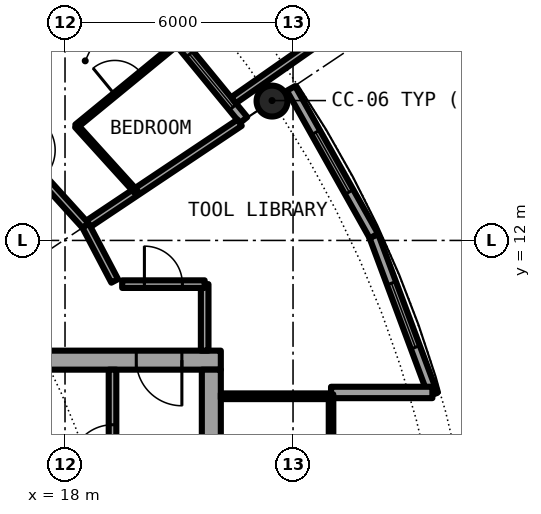
"""IFC4 building model, lengths in metres.
Left out: names, types, materials, properties, quantities, classifications, styles, units other than length and angle.
Written with IfcOpenShell. Run it as: python <this file> out.ifc"""

import sys

from ifc_helpers import new_model, si_unit, direction, frame, frame_2d, origin, origin_2d, place, context, subcontext, project, spatial, rectangle, hollow_circle, extrude, element, fill, save


model = new_model("IFC4")
c1 = context("Model", 3, precision=1e-05, world=origin(), true_north=direction((0.0, 1.0)))
c2 = subcontext(c1, "Body", "Model", "MODEL_VIEW")
j1 = project(units=[si_unit("LENGTHUNIT", "METRE"), si_unit("PLANEANGLEUNIT", "RADIAN")], contexts=[c1])
p1 = place(None, origin())
s1 = spatial("IfcSite", under=j1, at=p1, CompositionType="ELEMENT")
p2 = place(p1, origin())
s2 = spatial("IfcBuilding", under=s1, at=p2, CompositionType="ELEMENT")
p3 = place(p2, frame((0.0, 0.0, 145.2)))
s3 = spatial("IfcBuildingStorey", under=s2, at=p3, CompositionType="ELEMENT", Elevation=145.2)
p4 = place(p3, frame((23.448, 15.667, 0.0), z_axis=(0.0, 0.0, 1.0), x_axis=(1.0, 0.0, 0.0)))
e1 = element("IfcColumn", 1, at=p4, inside=s3, PredefinedType="COLUMN", context=c2, shape_type="SweptSolid", body=[
    extrude(hollow_circle(Radius=0.406, WallThickness=0.04, at=origin_2d()), origin(), (0.0, 0.0, 1.0), 3.05),
])
p5 = place(p3, frame((22.699, 15.167, 0.0), z_axis=(0.0, 0.0, 1.0), x_axis=(-0.634382322723, 0.773019449054, 0.0)))
e2 = element("IfcWall", 2, at=p5, inside=s3, PredefinedType="SOLIDWALL", context=c2, shape_type="SweptSolid", body=[
    extrude(rectangle(XDim=5.352, YDim=0.25, at=frame_2d((2.676, 0.0))), origin(), (0.0, 0.0, 1.0), 2.7),
])
p6 = place(p5, frame((0.441, 0.0, 0.3)))
e3 = element("IfcOpeningElement", 3, at=p6, cuts=e2, PredefinedType="OPENING", context=c2, shape_type="SweptSolid", body=[
    extrude(rectangle(XDim=1.8, YDim=2.1, at=frame_2d((0.9, 1.05))), frame((0.0, 0.135, 0.0), z_axis=(0.0, -1.0, 0.0), x_axis=(1.0, 0.0, 0.0)), (0.0, 0.0, 1.0), 0.27),
])
p7 = place(p5, frame((3.51, 0.0, 0.0)))
e4 = element("IfcOpeningElement", 4, at=p7, cuts=e2, PredefinedType="OPENING", context=c2, shape_type="SweptSolid", body=[
    extrude(rectangle(XDim=1.0, YDim=2.2, at=frame_2d((0.5, 1.1))), frame((0.0, 0.135, 0.0), z_axis=(0.0, -1.0, 0.0), x_axis=(1.0, 0.0, 0.0)), (0.0, 0.0, 1.0), 0.27),
])
p8 = place(p3, frame((22.433, 15.688, -0.03), z_axis=(0.0, 0.0, 1.0), x_axis=(0.819373043115, 0.573260687834, 0.0)))
e5 = element("IfcWall", 5, at=p8, inside=s3, PredefinedType="SOLIDWALL", context=c2, shape_type="SweptSolid", body=[
    extrude(rectangle(XDim=2.925, YDim=0.2, at=frame_2d((1.463, 0.0))), origin(), (0.0, 0.0, 1.0), 2.73),
])
p9 = place(p3, frame((27.682, 7.945, 0.0), z_axis=(0.0, 0.0, 1.0), x_axis=(-0.349247811493, 0.937030397675, 0.0)))
e6 = element("IfcWall", 6, at=p9, inside=s3, PredefinedType="SOLIDWALL", context=c2, shape_type="SweptSolid", body=[
    extrude(rectangle(XDim=4.452, YDim=0.25, at=frame_2d((2.226, 0.0))), origin(), (0.0, 0.0, 1.0), 2.7),
])
p10 = place(p9, frame((1.327, 0.0, 0.3)))
e7 = element("IfcOpeningElement", 7, at=p10, cuts=e6, PredefinedType="OPENING", context=c2, shape_type="SweptSolid", body=[
    extrude(rectangle(XDim=1.8, YDim=2.1, at=frame_2d((0.9, 1.05))), frame((0.0, 0.135, 0.0), z_axis=(0.0, -1.0, 0.0), x_axis=(1.0, 0.0, 0.0)), (0.0, 0.0, 1.0), 0.27),
])
p11 = place(p3, frame((26.127, 12.117, 0.0), z_axis=(0.0, 0.0, 1.0), x_axis=(-0.489696356642, 0.871893042919, 0.0)))
e8 = element("IfcWall", 8, at=p11, inside=s3, PredefinedType="SOLIDWALL", context=c2, shape_type="SweptSolid", body=[
    extrude(rectangle(XDim=4.454, YDim=0.25, at=frame_2d((2.227, 0.0))), origin(), (0.0, 0.0, 1.0), 2.7),
])
p12 = place(p11, frame((1.327, 0.0, 0.3)))
e9 = element("IfcOpeningElement", 9, at=p12, cuts=e8, PredefinedType="OPENING", context=c2, shape_type="SweptSolid", body=[
    extrude(rectangle(XDim=1.8, YDim=2.1, at=frame_2d((0.9, 1.05))), frame((0.0, 0.135, 0.0), z_axis=(0.0, -1.0, 0.0), x_axis=(1.0, 0.0, 0.0)), (0.0, 0.0, 1.0), 0.27),
])
p13 = place(p3, frame((25.0, 8.0, 0.0), z_axis=(0.0, 0.0, 1.0), x_axis=(1.0, 0.0, 0.0)))
e10 = element("IfcWall", 10, at=p13, inside=s3, PredefinedType="SOLIDWALL", context=c2, shape_type="SweptSolid", body=[
    extrude(rectangle(XDim=2.667, YDim=0.3, at=frame_2d((1.333, 0.0))), origin(), (0.0, 0.0, 1.0), 2.7),
])
p14 = place(p3, frame((22.1, 8.85, 0.0), z_axis=(0.0, 0.0, 1.0), x_axis=(-1.0, 0.0, 0.0)))
e11 = element("IfcWall", 11, at=p14, inside=s3, PredefinedType="SHEAR", context=c2, shape_type="SweptSolid", body=[
    extrude(rectangle(XDim=13.6, YDim=0.5, at=frame_2d((6.8, 0.0))), origin(), (0.0, 0.0, 1.0), 3.05),
])
p15 = place(p14, frame((1.025, 0.0, 0.0)))
e12 = element("IfcOpeningElement", 12, at=p15, cuts=e11, PredefinedType="OPENING", context=c2, shape_type="SweptSolid", body=[
    extrude(rectangle(XDim=1.2, YDim=2.3, at=frame_2d((0.6, 1.15))), frame((0.0, 0.26, 0.0), z_axis=(0.0, -1.0, 0.0), x_axis=(1.0, 0.0, 0.0)), (0.0, 0.0, 1.0), 0.52),
])
p16 = place(p3, frame((21.85, 8.6, 0.0), z_axis=(0.0, 0.0, 1.0), x_axis=(0.0, -1.0, 0.0)))
e13 = element("IfcWall", 13, at=p16, inside=s3, PredefinedType="SHEAR", context=c2, shape_type="SweptSolid", body=[
    extrude(rectangle(XDim=17.2, YDim=0.5, at=frame_2d((8.6, 0.0))), origin(), (0.0, 0.0, 1.0), 3.05),
])
p17 = place(p16, frame((7.7, 0.0, 0.0)))
e14 = element("IfcOpeningElement", 14, at=p17, cuts=e13, PredefinedType="OPENING", context=c2, shape_type="SweptSolid", body=[
    extrude(rectangle(XDim=1.8, YDim=2.3, at=frame_2d((0.9, 1.15))), frame((0.0, 0.26, 0.0), z_axis=(0.0, -1.0, 0.0), x_axis=(1.0, 0.0, 0.0)), (0.0, 0.0, 1.0), 0.52),
])
p18 = place(p3, frame((19.25, 1.575, 0.0), z_axis=(0.0, 0.0, 1.0), x_axis=(0.0, 1.0, 0.0)))
e15 = element("IfcWall", 15, at=p18, inside=s3, PredefinedType="SOLIDWALL", context=c2, shape_type="SweptSolid", body=[
    extrude(rectangle(XDim=7.025, YDim=0.2, at=frame_2d((3.513, 0.0))), origin(), (0.0, 0.0, 1.0), 2.7),
])
p19 = place(p18, frame((4.475, 0.0, 0.0)))
e16 = element("IfcOpeningElement", 16, at=p19, cuts=e15, PredefinedType="OPENING", context=c2, shape_type="SweptSolid", body=[
    extrude(rectangle(XDim=1.1, YDim=2.3, at=frame_2d((0.55, 1.15))), frame((0.0, 0.11, 0.0), z_axis=(0.0, -1.0, 0.0), x_axis=(1.0, 0.0, 0.0)), (0.0, 0.0, 1.0), 0.22),
])
p20 = place(p3, frame((22.1, 7.9, 0.0), z_axis=(0.0, 0.0, 1.0), x_axis=(1.0, 0.0, 0.0)))
e17 = element("IfcWall", 17, at=p20, inside=s3, PredefinedType="PARTITIONING", context=c2, shape_type="SweptSolid", body=[
    extrude(rectangle(XDim=2.84, YDim=0.15, at=frame_2d((1.42, 0.0))), origin(), (0.0, 0.0, 1.0), 2.7),
])
p21 = place(p3, frame((25.0, 7.95, 0.0), z_axis=(0.0, 0.0, 1.0), x_axis=(0.0, -1.0, 0.0)))
e18 = element("IfcWall", 18, at=p21, inside=s3, PredefinedType="PARTITIONING", context=c2, shape_type="SweptSolid", body=[
    extrude(rectangle(XDim=15.9, YDim=0.12, at=frame_2d((7.95, 0.0))), origin(), (0.0, 0.0, 1.0), 2.7),
])
p22 = place(p21, frame((6.75, 0.0, 0.0)))
e19 = element("IfcOpeningElement", 19, at=p22, cuts=e18, PredefinedType="OPENING", context=c2, shape_type="SweptSolid", body=[
    extrude(rectangle(XDim=2.4, YDim=2.3, at=frame_2d((1.2, 1.15))), frame((0.0, 0.07, 0.0), z_axis=(0.0, -1.0, 0.0), x_axis=(1.0, 0.0, 0.0)), (0.0, 0.0, 1.0), 0.14),
])
p23 = place(p21, frame((11.55, 0.0, 0.1)))
e20 = element("IfcOpeningElement", 20, at=p23, cuts=e18, PredefinedType="OPENING", context=c2, shape_type="SweptSolid", body=[
    extrude(rectangle(XDim=3.4, YDim=2.35, at=frame_2d((1.7, 1.175))), frame((0.0, 0.07, 0.0), z_axis=(0.0, -1.0, 0.0), x_axis=(1.0, 0.0, 0.0)), (0.0, 0.0, 1.0), 0.14),
])
p24 = place(p21, frame((0.95, 0.0, 0.1)))
e21 = element("IfcOpeningElement", 21, at=p24, cuts=e18, PredefinedType="OPENING", context=c2, shape_type="SweptSolid", body=[
    extrude(rectangle(XDim=3.4, YDim=2.35, at=frame_2d((1.7, 1.175))), frame((0.0, 0.07, 0.0), z_axis=(0.0, -1.0, 0.0), x_axis=(1.0, 0.0, 0.0)), (0.0, 0.0, 1.0), 0.14),
])
p25 = place(p3, frame((21.675, 9.1, 0.0), z_axis=(0.0, 0.0, 1.0), x_axis=(0.0, 1.0, 0.0)))
e22 = element("IfcWall", 22, at=p25, inside=s3, PredefinedType="PARTITIONING", context=c2, shape_type="SweptSolid", body=[
    extrude(rectangle(XDim=1.75, YDim=0.2, at=frame_2d((0.875, 0.0))), origin(), (0.0, 0.0, 1.0), 2.7),
])
p26 = place(p3, frame((18.302, 15.01, 0.0), z_axis=(0.0, 0.0, 1.0), x_axis=(0.773165322764, 0.634204528267, 0.0)))
e23 = element("IfcWall", 23, at=p26, inside=s3, PredefinedType="PARTITIONING", context=c2, shape_type="SweptSolid", body=[
    extrude(rectangle(XDim=3.505, YDim=0.1, at=frame_2d((1.752, 0.0))), origin(), (0.0, 0.0, 1.0), 2.7),
])
p27 = place(p26, frame((1.303, 0.0, 0.0)))
e24 = element("IfcOpeningElement", 24, at=p27, cuts=e23, PredefinedType="OPENING", context=c2, shape_type="SweptSolid", body=[
    extrude(rectangle(XDim=0.9, YDim=2.3, at=frame_2d((0.45, 1.15))), frame((0.0, 0.06, 0.0), z_axis=(0.0, -1.0, 0.0), x_axis=(1.0, 0.0, 0.0)), (0.0, 0.0, 1.0), 0.12),
])
p28 = place(p3, frame((18.542, 12.389, 0.0), z_axis=(0.0, 0.0, 1.0), x_axis=(0.831387096605, 0.55569370664, 0.0)))
e25 = element("IfcWall", 25, at=p28, inside=s3, PredefinedType="PARTITIONING", context=c2, shape_type="SweptSolid", body=[
    extrude(rectangle(XDim=4.875, YDim=0.2, at=frame_2d((2.438, 0.0))), origin(), (0.0, 0.0, 1.0), 2.7),
])
p29 = place(p3, frame((19.504, 10.85, 0.0), z_axis=(0.0, 0.0, 1.0), x_axis=(1.0, 0.0, 0.0)))
e26 = element("IfcWall", 26, at=p29, inside=s3, PredefinedType="PARTITIONING", context=c2, shape_type="SweptSolid", body=[
    extrude(rectangle(XDim=2.171, YDim=0.2, at=frame_2d((1.085, 0.0))), origin(), (0.0, 0.0, 1.0), 2.7),
])
p30 = place(p29, frame((0.585, 0.0, 0.0)))
e27 = element("IfcOpeningElement", 27, at=p30, cuts=e26, PredefinedType="OPENING", context=c2, shape_type="SweptSolid", body=[
    extrude(rectangle(XDim=1.0, YDim=2.3, at=frame_2d((0.5, 1.15))), frame((0.0, 0.11, 0.0), z_axis=(0.0, -1.0, 0.0), x_axis=(1.0, 0.0, 0.0)), (0.0, 0.0, 1.0), 0.22),
])
p31 = place(p3, frame((14.147, 17.238, 0.0), z_axis=(0.0, 0.0, 1.0), x_axis=(0.671561669125, -0.740948665268, 0.0)))
e28 = element("IfcWall", 28, at=p31, inside=s3, PredefinedType="PARTITIONING", context=c2, shape_type="SweptSolid", body=[
    extrude(rectangle(XDim=6.544, YDim=0.2, at=frame_2d((3.272, 0.0))), origin(), (0.0, 0.0, 1.0), 2.7),
])
p32 = place(p31, frame((3.862, 0.0, 0.0)))
e29 = element("IfcOpeningElement", 29, at=p32, cuts=e28, PredefinedType="OPENING", context=c2, shape_type="SweptSolid", body=[
    extrude(rectangle(XDim=1.0, YDim=2.3, at=frame_2d((0.5, 1.15))), frame((0.0, 0.11, 0.0), z_axis=(0.0, -1.0, 0.0), x_axis=(1.0, 0.0, 0.0)), (0.0, 0.0, 1.0), 0.22),
])
p33 = place(p3, frame((18.542, 12.389, 0.0), z_axis=(0.0, 0.0, 1.0), x_axis=(0.465605550524, -0.884992356646, 0.0)))
e30 = element("IfcWall", 30, at=p33, inside=s3, PredefinedType="PARTITIONING", context=c2, shape_type="SweptSolid", body=[
    extrude(rectangle(XDim=1.643, YDim=0.2, at=frame_2d((0.821, 0.0))), origin(), (0.0, 0.0, 1.0), 2.7),
])
p34 = place(p3, frame((18.302, 15.01, 0.0), z_axis=(0.0, 0.0, 1.0), x_axis=(0.671637685376, -0.740879760544, 0.0)))
e31 = element("IfcWall", 31, at=p34, inside=s3, PredefinedType="PARTITIONING", context=c2, shape_type="SweptSolid", body=[
    extrude(rectangle(XDim=2.338, YDim=0.1, at=frame_2d((1.169, 0.0))), origin(), (0.0, 0.0, 1.0), 2.7),
])
p35 = place(p6, origin())
e32 = element("IfcWindow", 32, at=p35, inside=s3, PartitioningType="SINGLE_PANEL", PredefinedType="WINDOW", context=c2, shape_type="SweptSolid", body=[
    extrude(rectangle(XDim=1.8, YDim=2.1, at=frame_2d((0.9, 1.05))), frame((0.0, 0.03, 0.0), z_axis=(0.0, -1.0, 0.0), x_axis=(1.0, 0.0, 0.0)), (0.0, 0.0, 1.0), 0.06),
])
fill(e3, e32)
p36 = place(p10, origin())
e33 = element("IfcWindow", 33, at=p36, inside=s3, PartitioningType="SINGLE_PANEL", PredefinedType="WINDOW", context=c2, shape_type="SweptSolid", body=[
    extrude(rectangle(XDim=1.8, YDim=2.1, at=frame_2d((0.9, 1.05))), frame((0.0, 0.03, 0.0), z_axis=(0.0, -1.0, 0.0), x_axis=(1.0, 0.0, 0.0)), (0.0, 0.0, 1.0), 0.06),
])
fill(e7, e33)
p37 = place(p12, origin())
e34 = element("IfcWindow", 34, at=p37, inside=s3, PartitioningType="SINGLE_PANEL", PredefinedType="WINDOW", context=c2, shape_type="SweptSolid", body=[
    extrude(rectangle(XDim=1.8, YDim=2.1, at=frame_2d((0.9, 1.05))), frame((0.0, 0.03, 0.0), z_axis=(0.0, -1.0, 0.0), x_axis=(1.0, 0.0, 0.0)), (0.0, 0.0, 1.0), 0.06),
])
fill(e9, e34)
p38 = place(p19, origin())
e35 = element("IfcDoor", 35, at=p38, inside=s3, OperationType="SINGLE_SWING_LEFT", PredefinedType="DOOR", context=c2, shape_type="SweptSolid", body=[
    extrude(rectangle(XDim=1.1, YDim=2.3, at=frame_2d((0.55, 1.15))), frame((0.0, 0.025, 0.0), z_axis=(0.0, -1.0, 0.0), x_axis=(1.0, 0.0, 0.0)), (0.0, 0.0, 1.0), 0.05),
])
fill(e16, e35)
p39 = place(p15, origin())
e36 = element("IfcDoor", 36, at=p39, inside=s3, OperationType="SINGLE_SWING_RIGHT", PredefinedType="DOOR", context=c2, shape_type="SweptSolid", body=[
    extrude(rectangle(XDim=1.2, YDim=2.3, at=frame_2d((0.6, 1.15))), frame((0.0, 0.025, 0.0), z_axis=(0.0, -1.0, 0.0), x_axis=(1.0, 0.0, 0.0)), (0.0, 0.0, 1.0), 0.05),
])
fill(e12, e36)
p40 = place(p24, origin())
e37 = element("IfcWindow", 37, at=p40, inside=s3, PartitioningType="SINGLE_PANEL", PredefinedType="WINDOW", context=c2, shape_type="SweptSolid", body=[
    extrude(rectangle(XDim=3.4, YDim=2.35, at=frame_2d((1.7, 1.175))), frame((0.0, 0.03, 0.0), z_axis=(0.0, -1.0, 0.0), x_axis=(1.0, 0.0, 0.0)), (0.0, 0.0, 1.0), 0.06),
])
fill(e21, e37)
p41 = place(p27, origin())
e38 = element("IfcDoor", 38, at=p41, inside=s3, OperationType="SINGLE_SWING_RIGHT", PredefinedType="DOOR", context=c2, shape_type="SweptSolid", body=[
    extrude(rectangle(XDim=0.9, YDim=2.3, at=frame_2d((0.45, 1.15))), frame((0.0, 0.025, 0.0), z_axis=(0.0, -1.0, 0.0), x_axis=(1.0, 0.0, 0.0)), (0.0, 0.0, 1.0), 0.05),
])
fill(e24, e38)
p42 = place(p30, origin())
e39 = element("IfcDoor", 39, at=p42, inside=s3, OperationType="SINGLE_SWING_LEFT", PredefinedType="DOOR", context=c2, shape_type="SweptSolid", body=[
    extrude(rectangle(XDim=1.0, YDim=2.3, at=frame_2d((0.5, 1.15))), frame((0.0, 0.025, 0.0), z_axis=(0.0, -1.0, 0.0), x_axis=(1.0, 0.0, 0.0)), (0.0, 0.0, 1.0), 0.05),
])
fill(e27, e39)
save(model, sys.argv[1])
